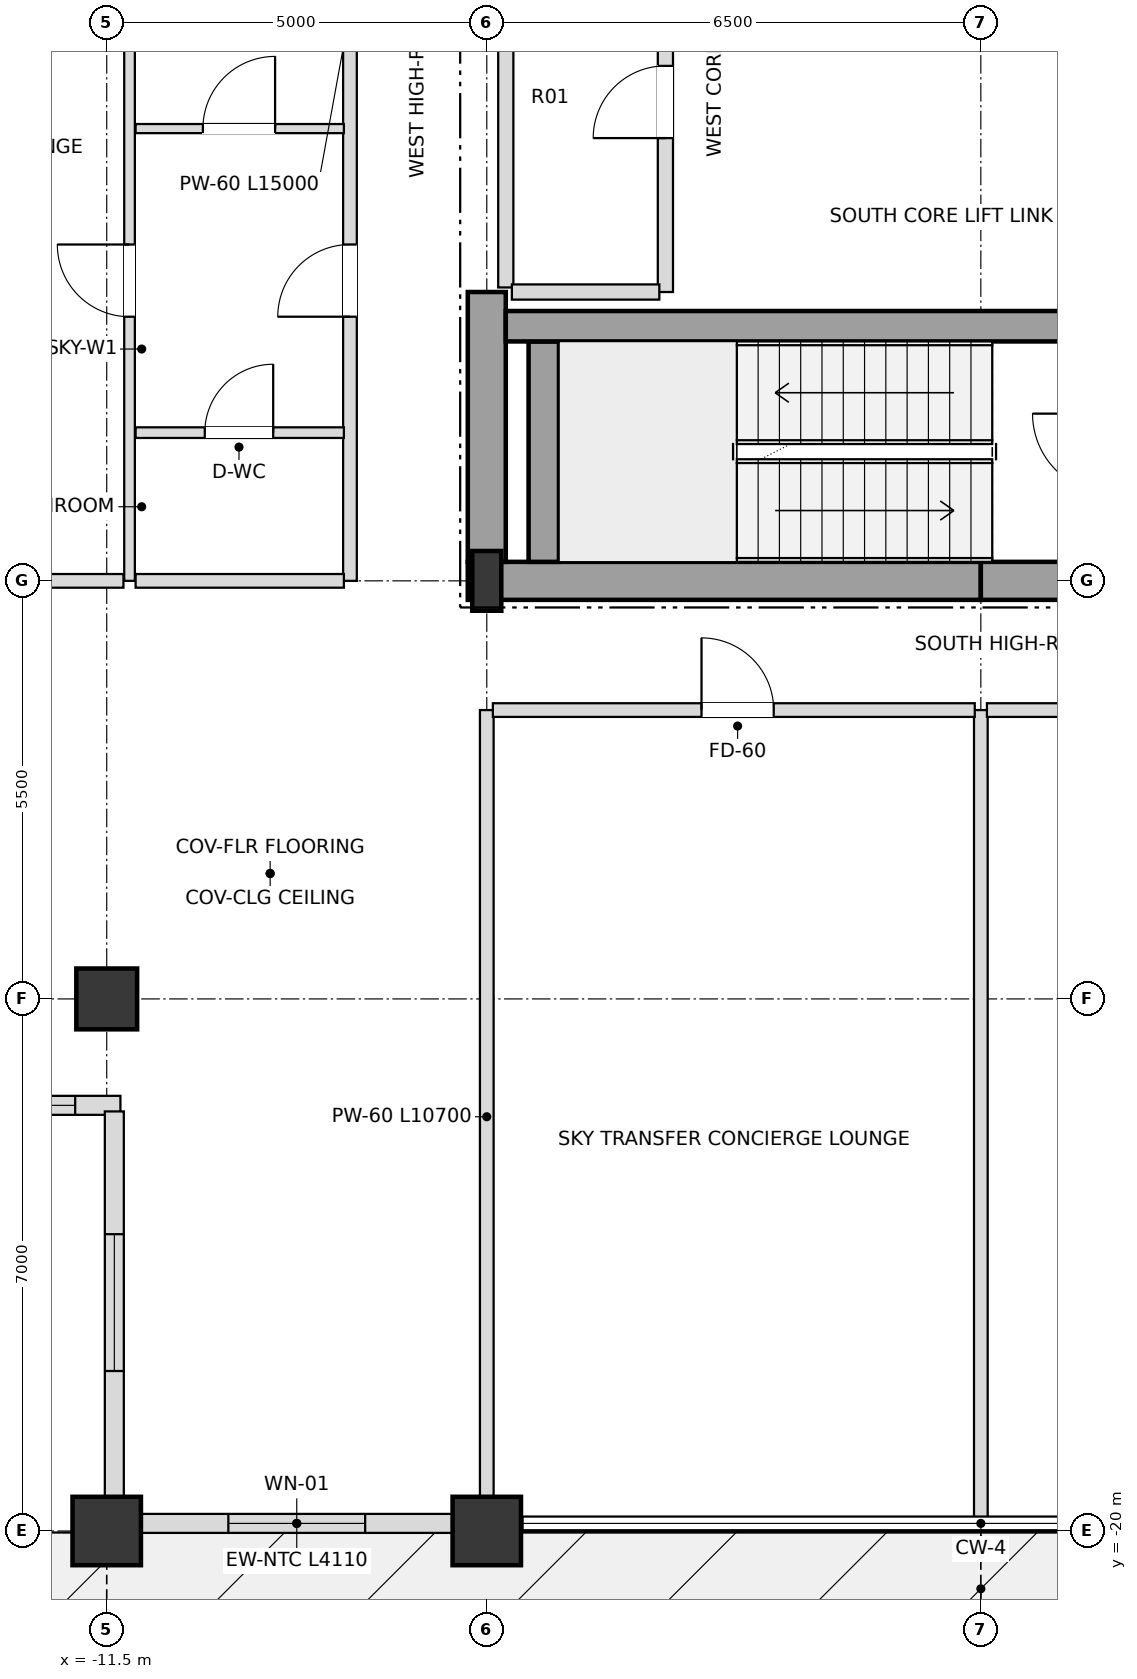
"""IFC4 building model, lengths in metres.
Left out: names, types, materials, properties, quantities, classifications, styles, units other than length and angle.
Written with IfcOpenShell. Run it as: python <this file> out.ifc"""

import sys

from ifc_helpers import new_model, si_unit, direction, frame, frame_2d, origin, origin_2d, place, context, subcontext, project, spatial, rectangle, i_section, extrude, element, fill, save


model = new_model("IFC4")
c1 = context("Model", 3, precision=1e-05, world=origin(), true_north=direction((0.0, 1.0)))
c2 = subcontext(c1, "Body", "Model", "MODEL_VIEW")
j1 = project(units=[si_unit("LENGTHUNIT", "METRE"), si_unit("PLANEANGLEUNIT", "RADIAN")], contexts=[c1])
p1 = place(None, origin())
s1 = spatial("IfcSite", under=j1, at=p1, CompositionType="ELEMENT")
p2 = place(p1, origin())
s2 = spatial("IfcBuilding", under=s1, at=p2, CompositionType="ELEMENT")
p3 = place(p2, frame((0.0, 0.0, 217.8)))
s3 = spatial("IfcBuildingStorey", under=s2, at=p3, CompositionType="ELEMENT", Elevation=217.8)
p4 = place(p3, frame((-6.5, -7.5, 0.0), z_axis=(0.0, 0.0, 1.0), x_axis=(1.0, 0.0, 0.0)))
e1 = element("IfcColumn", 1, at=p4, inside=s3, PredefinedType="COLUMN", context=c2, shape_type="SweptSolid", body=[
    extrude(i_section(OverallWidth=0.382, OverallDepth=0.786, WebThickness=0.02, FlangeThickness=0.033, at=origin_2d()), origin(), (0.0, 0.0, 1.0), 4.5),
])
for number, where, z_axis, x_axis in (
    (2, (-11.5, -20.0, 0.0), (0.0, 0.0, 1.0), (1.0, 0.0, 0.0)),
    (3, (-6.5, -20.0, 0.0), (0.0, 0.0, 1.0), (1.0, 0.0, 0.0)),
):
    element("IfcColumn", number, at=place(p3, frame(where, z_axis=z_axis, x_axis=x_axis)), inside=s3, PredefinedType="USERDEFINED", context=c2, shape_type="SweptSolid", body=[
        extrude(rectangle(XDim=0.9, YDim=0.9, at=origin_2d()), origin(), (0.0, 0.0, 1.0), 4.5),
    ])
p5 = place(p3, frame((-11.5, -13.0, 0.0), z_axis=(0.0, 0.0, 1.0), x_axis=(1.0, 0.0, 0.0)))
e4 = element("IfcColumn", 4, at=p5, inside=s3, PredefinedType="COLUMN", context=c2, shape_type="SweptSolid", body=[
    extrude(rectangle(XDim=0.8, YDim=0.8, at=origin_2d()), origin(), (0.0, 0.0, 1.0), 4.5),
])
p6 = place(p3, frame((-11.055, -19.9, 0.0), z_axis=(0.0, 0.0, 1.0), x_axis=(1.0, 0.0, 0.0)))
e5 = element("IfcWall", 5, at=p6, inside=s3, PredefinedType="SOLIDWALL", context=c2, shape_type="SweptSolid", body=[
    extrude(rectangle(XDim=4.11, YDim=0.25, at=frame_2d((2.055, 0.0))), origin(), (0.0, 0.0, 1.0), 3.648),
])
p7 = place(p6, frame((1.155, 0.0, 0.72)))
e6 = element("IfcOpeningElement", 6, at=p7, cuts=e5, PredefinedType="OPENING", context=c2, shape_type="SweptSolid", body=[
    extrude(rectangle(XDim=1.8, YDim=1.68, at=frame_2d((0.9, 0.84))), frame((0.0, 0.135, 0.0), z_axis=(0.0, -1.0, 0.0), x_axis=(1.0, 0.0, 0.0)), (0.0, 0.0, 1.0), 0.27),
])
p8 = place(p3, frame((-16.98, -14.4, 0.0), z_axis=(0.0, 0.0, 1.0), x_axis=(1.0, 0.0, 0.0)))
e7 = element("IfcWall", 7, at=p8, inside=s3, PredefinedType="SOLIDWALL", context=c2, shape_type="SweptSolid", body=[
    extrude(rectangle(XDim=5.66, YDim=0.25, at=frame_2d((2.83, 0.0))), origin(), (0.0, 0.0, 1.0), 3.648),
])
p9 = place(p8, frame((0.595, 0.0, 0.72)))
e8 = element("IfcOpeningElement", 8, at=p9, cuts=e7, PredefinedType="OPENING", context=c2, shape_type="SweptSolid", body=[
    extrude(rectangle(XDim=1.8, YDim=1.68, at=frame_2d((0.9, 0.84))), frame((0.0, 0.135, 0.0), z_axis=(0.0, -1.0, 0.0), x_axis=(1.0, 0.0, 0.0)), (0.0, 0.0, 1.0), 0.27),
])
p10 = place(p8, frame((3.265, 0.0, 0.72)))
e9 = element("IfcOpeningElement", 9, at=p10, cuts=e7, PredefinedType="OPENING", context=c2, shape_type="SweptSolid", body=[
    extrude(rectangle(XDim=1.8, YDim=1.68, at=frame_2d((0.9, 0.84))), frame((0.0, 0.135, 0.0), z_axis=(0.0, -1.0, 0.0), x_axis=(1.0, 0.0, 0.0)), (0.0, 0.0, 1.0), 0.27),
])
p11 = place(p3, frame((-11.4, -14.48, 0.0), z_axis=(0.0, 0.0, 1.0), x_axis=(0.0, -1.0, 0.0)))
e10 = element("IfcWall", 10, at=p11, inside=s3, PredefinedType="SOLIDWALL", context=c2, shape_type="SweptSolid", body=[
    extrude(rectangle(XDim=5.34, YDim=0.25, at=frame_2d((2.67, 0.0))), origin(), (0.0, 0.0, 1.0), 3.648),
])
p12 = place(p11, frame((1.615, 0.0, 0.72)))
e11 = element("IfcOpeningElement", 11, at=p12, cuts=e10, PredefinedType="OPENING", context=c2, shape_type="SweptSolid", body=[
    extrude(rectangle(XDim=1.8, YDim=1.68, at=frame_2d((0.9, 0.84))), frame((0.0, 0.135, 0.0), z_axis=(0.0, -1.0, 0.0), x_axis=(1.0, 0.0, 0.0)), (0.0, 0.0, 1.0), 0.27),
])
for number, where, z_axis, x_axis in (
    (12, (-6.75, -7.5, 0.0), (0.0, 0.0, 1.0), (1.0, 0.0, 0.0)),
    (13, (0.0, -7.5, 0.0), (0.0, 0.0, 1.0), (1.0, 0.0, 0.0)),
):
    element("IfcWall", number, at=place(p3, frame(where, z_axis=z_axis, x_axis=x_axis)), inside=s3, PredefinedType="SHEAR", context=c2, shape_type="SweptSolid", body=[
        extrude(rectangle(XDim=6.75, YDim=0.5, at=frame_2d((3.375, 0.0))), origin(), (0.0, 0.0, 1.0), 4.28),
    ])
p13 = place(p3, frame((-6.5, -7.25, 0.0), z_axis=(0.0, 0.0, 1.0), x_axis=(0.0, 1.0, 0.0)))
e14 = element("IfcWall", 14, at=p13, inside=s3, PredefinedType="SHEAR", context=c2, shape_type="SweptSolid", body=[
    extrude(rectangle(XDim=3.55, YDim=0.5, at=frame_2d((1.775, 0.0))), origin(), (0.0, 0.0, 1.0), 4.28),
])
p14 = place(p3, frame((-5.75, -7.25, 0.0), z_axis=(0.0, 0.0, 1.0), x_axis=(0.0, 1.0, 0.0)))
e15 = element("IfcWall", 15, at=p14, inside=s3, PredefinedType="SHEAR", context=c2, shape_type="SweptSolid", body=[
    extrude(rectangle(XDim=2.9, YDim=0.4, at=frame_2d((1.45, 0.0))), origin(), (0.0, 0.0, 1.0), 4.28),
])
p15 = place(p3, frame((-6.25, -4.15, 0.0), z_axis=(0.0, 0.0, 1.0), x_axis=(1.0, 0.0, 0.0)))
e16 = element("IfcWall", 16, at=p15, inside=s3, PredefinedType="SHEAR", context=c2, shape_type="SweptSolid", body=[
    extrude(rectangle(XDim=7.78, YDim=0.4, at=frame_2d((3.89, 0.0))), origin(), (0.0, 0.0, 1.0), 4.28),
])
p16 = place(p3, frame((-11.2, -7.5, 0.0), z_axis=(0.0, 0.0, 1.0), x_axis=(0.0, 1.0, 0.0)))
e17 = element("IfcWall", 17, at=p16, inside=s3, PredefinedType="PARTITIONING", context=c2, shape_type="SweptSolid", body=[
    extrude(rectangle(XDim=15.0, YDim=0.14, at=frame_2d((7.5, 0.0))), origin(), (0.0, 0.0, 1.0), 4.28),
])
p17 = place(p16, frame((3.475, 0.0, 0.0)))
e18 = element("IfcOpeningElement", 18, at=p17, cuts=e17, PredefinedType="OPENING", context=c2, shape_type="SweptSolid", body=[
    extrude(rectangle(XDim=0.95, YDim=2.1, at=frame_2d((0.475, 1.05))), frame((0.0, 0.08, 0.0), z_axis=(0.0, -1.0, 0.0), x_axis=(1.0, 0.0, 0.0)), (0.0, 0.0, 1.0), 0.16),
])
p18 = place(p3, frame((-8.3, -7.5, 0.0), z_axis=(0.0, 0.0, 1.0), x_axis=(0.0, 1.0, 0.0)))
e19 = element("IfcWall", 19, at=p18, inside=s3, PredefinedType="PARTITIONING", context=c2, shape_type="SweptSolid", body=[
    extrude(rectangle(XDim=15.0, YDim=0.18, at=frame_2d((7.5, 0.0))), origin(), (0.0, 0.0, 1.0), 4.28),
])
p19 = place(p18, frame((3.475, 0.0, 0.0)))
e20 = element("IfcOpeningElement", 20, at=p19, cuts=e19, PredefinedType="OPENING", context=c2, shape_type="SweptSolid", body=[
    extrude(rectangle(XDim=0.95, YDim=2.15, at=frame_2d((0.475, 1.075))), frame((0.0, 0.1, 0.0), z_axis=(0.0, -1.0, 0.0), x_axis=(1.0, 0.0, 0.0)), (0.0, 0.0, 1.0), 0.2),
])
p20 = place(p3, frame((-6.5, -19.9, 0.0), z_axis=(0.0, 0.0, 1.0), x_axis=(0.0, 1.0, 0.0)))
e21 = element("IfcWall", 21, at=p20, inside=s3, PredefinedType="PARTITIONING", context=c2, shape_type="SweptSolid", body=[
    extrude(rectangle(XDim=10.7, YDim=0.18, at=frame_2d((5.35, 0.0))), origin(), (0.0, 0.0, 1.0), 3.726),
])
p21 = place(p3, frame((-6.25, -3.64, 0.0), z_axis=(0.0, 0.0, 1.0), x_axis=(0.0, 1.0, 0.0)))
e22 = element("IfcWall", 22, at=p21, inside=s3, PredefinedType="SOLIDWALL", context=c2, shape_type="SweptSolid", body=[
    extrude(rectangle(XDim=7.34, YDim=0.2, at=frame_2d((3.67, 0.0))), origin(), (0.0, 0.0, 1.0), 4.28),
])
p22 = place(p3, frame((-4.15, -3.7, 0.0), z_axis=(0.0, 0.0, 1.0), x_axis=(0.0, 1.0, 0.0)))
e23 = element("IfcWall", 23, at=p22, inside=s3, PredefinedType="SOLIDWALL", context=c2, shape_type="SweptSolid", body=[
    extrude(rectangle(XDim=7.4, YDim=0.2, at=frame_2d((3.7, 0.0))), origin(), (0.0, 0.0, 1.0), 4.28),
])
p23 = place(p22, frame((2.025, 0.0, 0.0)))
e24 = element("IfcOpeningElement", 24, at=p23, cuts=e23, PredefinedType="OPENING", context=c2, shape_type="SweptSolid", body=[
    extrude(rectangle(XDim=0.95, YDim=2.15, at=frame_2d((0.475, 1.075))), frame((0.0, 0.11, 0.0), z_axis=(0.0, -1.0, 0.0), x_axis=(1.0, 0.0, 0.0)), (0.0, 0.0, 1.0), 0.22),
])
p24 = place(p22, frame((5.775, 0.0, 0.0)))
e25 = element("IfcOpeningElement", 25, at=p24, cuts=e23, PredefinedType="OPENING", context=c2, shape_type="SweptSolid", body=[
    extrude(rectangle(XDim=0.95, YDim=2.15, at=frame_2d((0.475, 1.075))), frame((0.0, 0.11, 0.0), z_axis=(0.0, -1.0, 0.0), x_axis=(1.0, 0.0, 0.0)), (0.0, 0.0, 1.0), 0.22),
])
p25 = place(p3, frame((0.0, -19.9, 0.0), z_axis=(0.0, 0.0, 1.0), x_axis=(0.0, 1.0, 0.0)))
e26 = element("IfcWall", 26, at=p25, inside=s3, PredefinedType="PARTITIONING", context=c2, shape_type="SweptSolid", body=[
    extrude(rectangle(XDim=10.7, YDim=0.18, at=frame_2d((5.35, 0.0))), origin(), (0.0, 0.0, 1.0), 3.918),
])
p26 = place(p3, frame((-6.42, -9.2, 0.0), z_axis=(0.0, 0.0, 1.0), x_axis=(1.0, 0.0, 0.0)))
e27 = element("IfcWall", 27, at=p26, inside=s3, PredefinedType="PARTITIONING", context=c2, shape_type="SweptSolid", body=[
    extrude(rectangle(XDim=6.34, YDim=0.18, at=frame_2d((3.17, 0.0))), origin(), (0.0, 0.0, 1.0), 4.28),
])
p27 = place(p26, frame((2.745, 0.0, 0.0)))
e28 = element("IfcOpeningElement", 28, at=p27, cuts=e27, PredefinedType="OPENING", context=c2, shape_type="SweptSolid", body=[
    extrude(rectangle(XDim=0.95, YDim=2.15, at=frame_2d((0.475, 1.075))), frame((0.0, 0.1, 0.0), z_axis=(0.0, -1.0, 0.0), x_axis=(1.0, 0.0, 0.0)), (0.0, 0.0, 1.0), 0.2),
])
p28 = place(p3, frame((0.08, -9.2, 0.0), z_axis=(0.0, 0.0, 1.0), x_axis=(1.0, 0.0, 0.0)))
e29 = element("IfcWall", 29, at=p28, inside=s3, PredefinedType="PARTITIONING", context=c2, shape_type="SweptSolid", body=[
    extrude(rectangle(XDim=8.14, YDim=0.18, at=frame_2d((4.07, 0.0))), origin(), (0.0, 0.0, 1.0), 3.726),
])
p29 = place(p28, frame((3.445, 0.0, 0.0)))
e30 = element("IfcOpeningElement", 30, at=p29, cuts=e29, PredefinedType="OPENING", context=c2, shape_type="SweptSolid", body=[
    extrude(rectangle(XDim=0.95, YDim=2.15, at=frame_2d((0.475, 1.075))), frame((0.0, 0.1, 0.0), z_axis=(0.0, -1.0, 0.0), x_axis=(1.0, 0.0, 0.0)), (0.0, 0.0, 1.0), 0.2),
])
p30 = place(p3, frame((-16.9, -7.5, 0.0), z_axis=(0.0, 0.0, 1.0), x_axis=(1.0, 0.0, 0.0)))
e31 = element("IfcWall", 31, at=p30, inside=s3, PredefinedType="PARTITIONING", context=c2, shape_type="SweptSolid", body=[
    extrude(rectangle(XDim=5.62, YDim=0.18, at=frame_2d((2.81, 0.0))), origin(), (0.0, 0.0, 1.0), 3.726),
])
p31 = place(p3, frame((-11.12, -7.5, 0.0), z_axis=(0.0, 0.0, 1.0), x_axis=(1.0, 0.0, 0.0)))
e32 = element("IfcWall", 32, at=p31, inside=s3, PredefinedType="PARTITIONING", context=c2, shape_type="SweptSolid", body=[
    extrude(rectangle(XDim=2.74, YDim=0.18, at=frame_2d((1.37, 0.0))), origin(), (0.0, 0.0, 1.0), 3.726),
])
p32 = place(p3, frame((-11.12, -5.55, 0.0), z_axis=(0.0, 0.0, 1.0), x_axis=(1.0, 0.0, 0.0)))
e33 = element("IfcWall", 33, at=p32, inside=s3, PredefinedType="PARTITIONING", context=c2, shape_type="SweptSolid", body=[
    extrude(rectangle(XDim=2.74, YDim=0.14, at=frame_2d((1.37, 0.0))), origin(), (0.0, 0.0, 1.0), 4.28),
])
p33 = place(p32, frame((0.91, 0.0, 0.0)))
e34 = element("IfcOpeningElement", 34, at=p33, cuts=e33, PredefinedType="OPENING", context=c2, shape_type="SweptSolid", body=[
    extrude(rectangle(XDim=0.9, YDim=2.1, at=frame_2d((0.45, 1.05))), frame((0.0, 0.08, 0.0), z_axis=(0.0, -1.0, 0.0), x_axis=(1.0, 0.0, 0.0)), (0.0, 0.0, 1.0), 0.16),
])
p34 = place(p3, frame((-6.17, -3.7, 0.0), z_axis=(0.0, 0.0, 1.0), x_axis=(1.0, 0.0, 0.0)))
e35 = element("IfcWall", 35, at=p34, inside=s3, PredefinedType="SOLIDWALL", context=c2, shape_type="SweptSolid", body=[
    extrude(rectangle(XDim=1.94, YDim=0.2, at=frame_2d((0.97, 0.0))), origin(), (0.0, 0.0, 1.0), 4.28),
])
p35 = place(p3, frame((-11.12, -1.55, 0.0), z_axis=(0.0, 0.0, 1.0), x_axis=(1.0, 0.0, 0.0)))
e36 = element("IfcWall", 36, at=p35, inside=s3, PredefinedType="PARTITIONING", context=c2, shape_type="SweptSolid", body=[
    extrude(rectangle(XDim=2.74, YDim=0.12, at=frame_2d((1.37, 0.0))), origin(), (0.0, 0.0, 1.0), 4.28),
])
p36 = place(p35, frame((0.885, 0.0, 0.0)))
e37 = element("IfcOpeningElement", 37, at=p36, cuts=e36, PredefinedType="OPENING", context=c2, shape_type="SweptSolid", body=[
    extrude(rectangle(XDim=0.95, YDim=2.1, at=frame_2d((0.475, 1.05))), frame((0.0, 0.07, 0.0), z_axis=(0.0, -1.0, 0.0), x_axis=(1.0, 0.0, 0.0)), (0.0, 0.0, 1.0), 0.14),
])
p37 = place(p7, origin())
e38 = element("IfcWindow", 38, at=p37, inside=s3, PartitioningType="SINGLE_PANEL", PredefinedType="WINDOW", context=c2, shape_type="SweptSolid", body=[
    extrude(rectangle(XDim=1.8, YDim=1.68, at=frame_2d((0.9, 0.84))), frame((0.0, 0.03, 0.0), z_axis=(0.0, -1.0, 0.0), x_axis=(1.0, 0.0, 0.0)), (0.0, 0.0, 1.0), 0.06),
])
fill(e6, e38)
p38 = place(p10, origin())
e39 = element("IfcWindow", 39, at=p38, inside=s3, PartitioningType="SINGLE_PANEL", PredefinedType="WINDOW", context=c2, shape_type="SweptSolid", body=[
    extrude(rectangle(XDim=1.8, YDim=1.68, at=frame_2d((0.9, 0.84))), frame((0.0, 0.03, 0.0), z_axis=(0.0, -1.0, 0.0), x_axis=(1.0, 0.0, 0.0)), (0.0, 0.0, 1.0), 0.06),
])
fill(e9, e39)
p39 = place(p12, origin())
e40 = element("IfcWindow", 40, at=p39, inside=s3, PartitioningType="SINGLE_PANEL", PredefinedType="WINDOW", context=c2, shape_type="SweptSolid", body=[
    extrude(rectangle(XDim=1.8, YDim=1.68, at=frame_2d((0.9, 0.84))), frame((0.0, 0.03, 0.0), z_axis=(0.0, -1.0, 0.0), x_axis=(1.0, 0.0, 0.0)), (0.0, 0.0, 1.0), 0.06),
])
fill(e11, e40)
p40 = place(p23, origin())
e41 = element("IfcDoor", 41, at=p40, inside=s3, OperationType="SINGLE_SWING_LEFT", PredefinedType="DOOR", context=c2, shape_type="SweptSolid", body=[
    extrude(rectangle(XDim=0.95, YDim=2.15, at=frame_2d((0.475, 1.075))), frame((0.0, 0.025, 0.0), z_axis=(0.0, -1.0, 0.0), x_axis=(1.0, 0.0, 0.0)), (0.0, 0.0, 1.0), 0.05),
])
fill(e24, e41)
p41 = place(p27, origin())
e42 = element("IfcDoor", 42, at=p41, inside=s3, OperationType="SINGLE_SWING_LEFT", PredefinedType="DOOR", context=c2, shape_type="SweptSolid", body=[
    extrude(rectangle(XDim=0.95, YDim=2.15, at=frame_2d((0.475, 1.075))), frame((0.0, 0.025, 0.0), z_axis=(0.0, -1.0, 0.0), x_axis=(1.0, 0.0, 0.0)), (0.0, 0.0, 1.0), 0.05),
])
fill(e28, e42)
p42 = place(p33, origin())
e43 = element("IfcDoor", 43, at=p42, inside=s3, OperationType="SINGLE_SWING_RIGHT", PredefinedType="DOOR", context=c2, shape_type="SweptSolid", body=[
    extrude(rectangle(XDim=0.9, YDim=2.1, at=frame_2d((0.45, 1.05))), frame((0.0, 0.025, 0.0), z_axis=(0.0, -1.0, 0.0), x_axis=(1.0, 0.0, 0.0)), (0.0, 0.0, 1.0), 0.05),
])
fill(e34, e43)
p43 = place(p19, origin())
e44 = element("IfcDoor", 44, at=p43, inside=s3, OperationType="SINGLE_SWING_LEFT", PredefinedType="DOOR", context=c2, shape_type="SweptSolid", body=[
    extrude(rectangle(XDim=0.95, YDim=2.15, at=frame_2d((0.475, 1.075))), frame((0.0, 0.025, 0.0), z_axis=(0.0, -1.0, 0.0), x_axis=(1.0, 0.0, 0.0)), (0.0, 0.0, 1.0), 0.05),
])
fill(e20, e44)
p44 = place(p36, origin())
e45 = element("IfcDoor", 45, at=p44, inside=s3, OperationType="SINGLE_SWING_RIGHT", PredefinedType="DOOR", context=c2, shape_type="SweptSolid", body=[
    extrude(rectangle(XDim=0.95, YDim=2.1, at=frame_2d((0.475, 1.05))), frame((0.0, 0.025, 0.0), z_axis=(0.0, -1.0, 0.0), x_axis=(1.0, 0.0, 0.0)), (0.0, 0.0, 1.0), 0.05),
])
fill(e37, e45)
p45 = place(p17, origin())
e46 = element("IfcDoor", 46, at=p45, inside=s3, OperationType="SINGLE_SWING_RIGHT", PredefinedType="DOOR", context=c2, shape_type="SweptSolid", body=[
    extrude(rectangle(XDim=0.95, YDim=2.1, at=frame_2d((0.475, 1.05))), frame((0.0, 0.025, 0.0), z_axis=(0.0, -1.0, 0.0), x_axis=(1.0, 0.0, 0.0)), (0.0, 0.0, 1.0), 0.05),
])
fill(e18, e46)
save(model, sys.argv[1])
